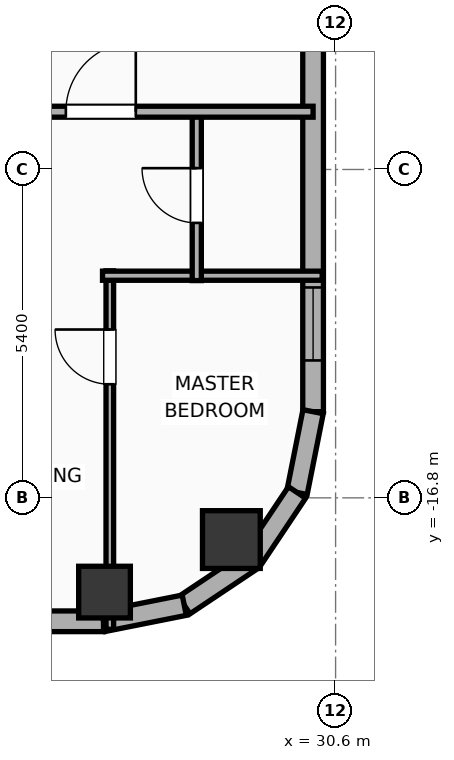
"""IFC4 building model, lengths in metres.
Left out: names, types, materials, properties, quantities, classifications, styles, units other than length and angle.
Written with IfcOpenShell. Run it as: python <this file> out.ifc"""

import sys

from ifc_helpers import new_model, si_unit, direction, frame, frame_2d, origin, origin_2d, place, context, subcontext, project, spatial, rectangle, hollow_rectangle, hollow_circle, extrude, element, fill, save


model = new_model("IFC4")
c1 = context("Model", 3, precision=1e-05, world=origin(), true_north=direction((0.0, 1.0)))
c2 = subcontext(c1, "Body", "Model", "MODEL_VIEW")
j1 = project(units=[si_unit("LENGTHUNIT", "METRE"), si_unit("PLANEANGLEUNIT", "RADIAN")], contexts=[c1])
p1 = place(None, origin())
s1 = spatial("IfcSite", under=j1, at=p1, CompositionType="ELEMENT")
p2 = place(p1, origin())
s2 = spatial("IfcBuilding", under=s1, at=p2, CompositionType="ELEMENT")
p3 = place(p2, frame((0.0, 0.0, 239.2)))
s3 = spatial("IfcBuildingStorey", under=s2, at=p3, CompositionType="ELEMENT", Elevation=239.2)
p4 = place(p3, frame((26.8, -18.35, 0.0), z_axis=(0.0, 0.0, 1.0), x_axis=(1.0, 0.0, 0.0)))
e1 = element("IfcColumn", 1, at=p4, inside=s3, PredefinedType="COLUMN", context=c2, shape_type="SweptSolid", body=[
    extrude(hollow_rectangle(XDim=0.85, YDim=0.85, WallThickness=0.028, at=origin_2d()), origin(), (0.0, 0.0, 1.0), 3.9),
])
p5 = place(p3, frame((28.886, -17.486, 0.0), z_axis=(0.0, 0.0, 1.0), x_axis=(1.0, 0.0, 0.0)))
e2 = element("IfcColumn", 2, at=p5, inside=s3, PredefinedType="COLUMN", context=c2, shape_type="SweptSolid", body=[
    extrude(hollow_circle(Radius=0.475, WallThickness=0.032, at=origin_2d()), origin(), (0.0, 0.0, 1.0), 3.9),
])
p6 = place(p3, frame((26.783, -18.83, 0.0), z_axis=(0.0, 0.0, 1.0), x_axis=(-1.0, 0.0, 0.0)))
e3 = element("IfcWall", 3, at=p6, inside=s3, PredefinedType="ELEMENTEDWALL", context=c2, shape_type="SweptSolid", body=[
    extrude(rectangle(XDim=49.566, YDim=0.34, at=frame_2d((24.783, 0.0))), origin(), (0.0, 0.0, 1.0), 3.65),
])
p7 = place(p6, frame((23.583, 0.0, 0.75)))
e4 = element("IfcOpeningElement", 4, at=p7, cuts=e3, PredefinedType="OPENING", context=c2, shape_type="SweptSolid", body=[
    extrude(rectangle(XDim=2.4, YDim=2.1, at=frame_2d((1.2, 1.05))), frame((0.0, 0.18, 0.0), z_axis=(0.0, -1.0, 0.0), x_axis=(1.0, 0.0, 0.0)), (0.0, 0.0, 1.0), 0.36),
])
p8 = place(p6, frame((41.756, 0.0, 0.75)))
e5 = element("IfcOpeningElement", 5, at=p8, cuts=e3, PredefinedType="OPENING", context=c2, shape_type="SweptSolid", body=[
    extrude(rectangle(XDim=2.4, YDim=2.1, at=frame_2d((1.2, 1.05))), frame((0.0, 0.18, 0.0), z_axis=(0.0, -1.0, 0.0), x_axis=(1.0, 0.0, 0.0)), (0.0, 0.0, 1.0), 0.36),
])
p9 = place(p6, frame((47.222, 0.0, 0.75)))
e6 = element("IfcOpeningElement", 6, at=p9, cuts=e3, PredefinedType="OPENING", context=c2, shape_type="SweptSolid", body=[
    extrude(rectangle(XDim=1.2, YDim=2.05, at=frame_2d((0.6, 1.025))), frame((0.0, 0.18, 0.0), z_axis=(0.0, -1.0, 0.0), x_axis=(1.0, 0.0, 0.0)), (0.0, 0.0, 1.0), 0.36),
])
p10 = place(p6, frame((45.263, 0.0, 0.75)))
e7 = element("IfcOpeningElement", 7, at=p10, cuts=e3, PredefinedType="OPENING", context=c2, shape_type="SweptSolid", body=[
    extrude(rectangle(XDim=1.2, YDim=2.05, at=frame_2d((0.6, 1.025))), frame((0.0, 0.18, 0.0), z_axis=(0.0, -1.0, 0.0), x_axis=(1.0, 0.0, 0.0)), (0.0, 0.0, 1.0), 0.36),
])
p11 = place(p6, frame((37.289, 0.0, 0.75)))
e8 = element("IfcOpeningElement", 8, at=p11, cuts=e3, PredefinedType="OPENING", context=c2, shape_type="SweptSolid", body=[
    extrude(rectangle(XDim=1.2, YDim=2.05, at=frame_2d((0.6, 1.025))), frame((0.0, 0.18, 0.0), z_axis=(0.0, -1.0, 0.0), x_axis=(1.0, 0.0, 0.0)), (0.0, 0.0, 1.0), 0.36),
])
p12 = place(p6, frame((16.115, 0.0, 0.75)))
e9 = element("IfcOpeningElement", 9, at=p12, cuts=e3, PredefinedType="OPENING", context=c2, shape_type="SweptSolid", body=[
    extrude(rectangle(XDim=1.2, YDim=2.05, at=frame_2d((0.6, 1.025))), frame((0.0, 0.18, 0.0), z_axis=(0.0, -1.0, 0.0), x_axis=(1.0, 0.0, 0.0)), (0.0, 0.0, 1.0), 0.36),
])
p13 = place(p6, frame((12.422, 0.0, 0.75)))
e10 = element("IfcOpeningElement", 10, at=p13, cuts=e3, PredefinedType="OPENING", context=c2, shape_type="SweptSolid", body=[
    extrude(rectangle(XDim=1.2, YDim=2.05, at=frame_2d((0.6, 1.025))), frame((0.0, 0.18, 0.0), z_axis=(0.0, -1.0, 0.0), x_axis=(1.0, 0.0, 0.0)), (0.0, 0.0, 1.0), 0.36),
])
p14 = place(p6, frame((8.01, 0.0, 0.75)))
e11 = element("IfcOpeningElement", 11, at=p14, cuts=e3, PredefinedType="OPENING", context=c2, shape_type="SweptSolid", body=[
    extrude(rectangle(XDim=1.2, YDim=2.05, at=frame_2d((0.6, 1.025))), frame((0.0, 0.18, 0.0), z_axis=(0.0, -1.0, 0.0), x_axis=(1.0, 0.0, 0.0)), (0.0, 0.0, 1.0), 0.36),
])
p15 = place(p6, frame((5.037, 0.0, 0.75)))
e12 = element("IfcOpeningElement", 12, at=p15, cuts=e3, PredefinedType="OPENING", context=c2, shape_type="SweptSolid", body=[
    extrude(rectangle(XDim=1.2, YDim=2.05, at=frame_2d((0.6, 1.025))), frame((0.0, 0.18, 0.0), z_axis=(0.0, -1.0, 0.0), x_axis=(1.0, 0.0, 0.0)), (0.0, 0.0, 1.0), 0.36),
])
p16 = place(p6, frame((1.811, 0.0, 0.75)))
e13 = element("IfcOpeningElement", 13, at=p16, cuts=e3, PredefinedType="OPENING", context=c2, shape_type="SweptSolid", body=[
    extrude(rectangle(XDim=1.2, YDim=2.05, at=frame_2d((0.6, 1.025))), frame((0.0, 0.18, 0.0), z_axis=(0.0, -1.0, 0.0), x_axis=(1.0, 0.0, 0.0)), (0.0, 0.0, 1.0), 0.36),
])
p17 = place(p6, frame((32.253, 0.0, 0.75)))
e14 = element("IfcOpeningElement", 14, at=p17, cuts=e3, PredefinedType="OPENING", context=c2, shape_type="SweptSolid", body=[
    extrude(rectangle(XDim=1.2, YDim=2.05, at=frame_2d((0.6, 1.025))), frame((0.0, 0.18, 0.0), z_axis=(0.0, -1.0, 0.0), x_axis=(1.0, 0.0, 0.0)), (0.0, 0.0, 1.0), 0.36),
])
p18 = place(p6, frame((27.853, 0.0, 0.75)))
e15 = element("IfcOpeningElement", 15, at=p18, cuts=e3, PredefinedType="OPENING", context=c2, shape_type="SweptSolid", body=[
    extrude(rectangle(XDim=1.2, YDim=2.05, at=frame_2d((0.6, 1.025))), frame((0.0, 0.18, 0.0), z_axis=(0.0, -1.0, 0.0), x_axis=(1.0, 0.0, 0.0)), (0.0, 0.0, 1.0), 0.36),
])
p19 = place(p6, frame((20.473, 0.0, 0.75)))
e16 = element("IfcOpeningElement", 16, at=p19, cuts=e3, PredefinedType="OPENING", context=c2, shape_type="SweptSolid", body=[
    extrude(rectangle(XDim=1.2, YDim=2.05, at=frame_2d((0.6, 1.025))), frame((0.0, 0.18, 0.0), z_axis=(0.0, -1.0, 0.0), x_axis=(1.0, 0.0, 0.0)), (0.0, 0.0, 1.0), 0.36),
])
p20 = place(p3, frame((30.23, 16.583, 0.0), z_axis=(0.0, 0.0, 1.0), x_axis=(0.0, -1.0, 0.0)))
e17 = element("IfcWall", 17, at=p20, inside=s3, PredefinedType="ELEMENTEDWALL", context=c2, shape_type="SweptSolid", body=[
    extrude(rectangle(XDim=31.967, YDim=0.34, at=frame_2d((15.983, 0.0))), origin(), (0.0, 0.0, 1.0), 3.65),
])
p21 = place(p20, frame((29.924, 0.0, 0.75)))
e18 = element("IfcOpeningElement", 18, at=p21, cuts=e17, PredefinedType="OPENING", context=c2, shape_type="SweptSolid", body=[
    extrude(rectangle(XDim=1.2, YDim=2.05, at=frame_2d((0.6, 1.025))), frame((0.0, 0.18, 0.0), z_axis=(0.0, -1.0, 0.0), x_axis=(1.0, 0.0, 0.0)), (0.0, 0.0, 1.0), 0.36),
])
p22 = place(p20, frame((11.463, 0.0, 0.75)))
e19 = element("IfcOpeningElement", 19, at=p22, cuts=e17, PredefinedType="OPENING", context=c2, shape_type="SweptSolid", body=[
    extrude(rectangle(XDim=1.2, YDim=2.05, at=frame_2d((0.6, 1.025))), frame((0.0, 0.18, 0.0), z_axis=(0.0, -1.0, 0.0), x_axis=(1.0, 0.0, 0.0)), (0.0, 0.0, 1.0), 0.36),
])
p23 = place(p20, frame((20.363, 0.0, 0.75)))
e20 = element("IfcOpeningElement", 20, at=p23, cuts=e17, PredefinedType="OPENING", context=c2, shape_type="SweptSolid", body=[
    extrude(rectangle(XDim=1.2, YDim=2.05, at=frame_2d((0.6, 1.025))), frame((0.0, 0.18, 0.0), z_axis=(0.0, -1.0, 0.0), x_axis=(1.0, 0.0, 0.0)), (0.0, 0.0, 1.0), 0.36),
])
p24 = place(p3, frame((30.23, -15.383, 0.0), z_axis=(0.0, 0.0, 1.0), x_axis=(-0.195110379894, -0.98078129043, 0.0)))
e21 = element("IfcWall", 21, at=p24, inside=s3, PredefinedType="ELEMENTEDWALL", context=c2, shape_type="SweptSolid", body=[
    extrude(rectangle(XDim=1.354, YDim=0.34, at=frame_2d((0.677, 0.0))), origin(), (0.0, 0.0, 1.0), 3.65),
])
p25 = place(p3, frame((29.966, -16.711, 0.0), z_axis=(0.0, 0.0, 1.0), x_axis=(-0.555584683399, -0.831459956686, 0.0)))
e22 = element("IfcWall", 22, at=p25, inside=s3, PredefinedType="ELEMENTEDWALL", context=c2, shape_type="SweptSolid", body=[
    extrude(rectangle(XDim=1.337, YDim=0.34, at=frame_2d((0.668, 0.0))), origin(), (0.0, 0.0, 1.0), 3.65),
])
p26 = place(p3, frame((29.223, -17.823, 0.0), z_axis=(0.0, 0.0, 1.0), x_axis=(-0.831403586725, -0.555669034571, 0.0)))
e23 = element("IfcWall", 23, at=p26, inside=s3, PredefinedType="ELEMENTEDWALL", context=c2, shape_type="SweptSolid", body=[
    extrude(rectangle(XDim=1.337, YDim=0.34, at=frame_2d((0.668, 0.0))), origin(), (0.0, 0.0, 1.0), 3.65),
])
p27 = place(p3, frame((28.111, -18.566, 0.0), z_axis=(0.0, 0.0, 1.0), x_axis=(-0.980788153188, -0.195075878998, 0.0)))
e24 = element("IfcWall", 24, at=p27, inside=s3, PredefinedType="ELEMENTEDWALL", context=c2, shape_type="SweptSolid", body=[
    extrude(rectangle(XDim=1.354, YDim=0.34, at=frame_2d((0.677, 0.0))), origin(), (0.0, 0.0, 1.0), 3.65),
])
p28 = place(p3, frame((26.887, -18.962, 0.0), z_axis=(0.0, 0.0, 1.0), x_axis=(0.0, 1.0, 0.0)))
e25 = element("IfcWall", 25, at=p28, inside=s3, PredefinedType="PARTITIONING", context=c2, shape_type="SweptSolid", body=[
    extrude(rectangle(XDim=5.896, YDim=0.125, at=frame_2d((2.948, 0.0))), origin(), (0.0, 0.0, 1.0), 3.65),
])
p29 = place(p28, frame((4.031, 0.0, 0.0)))
e26 = element("IfcOpeningElement", 26, at=p29, cuts=e25, PredefinedType="OPENING", context=c2, shape_type="SweptSolid", body=[
    extrude(rectangle(XDim=0.9, YDim=2.05, at=frame_2d((0.45, 1.025))), frame((0.0, 0.073, 0.0), z_axis=(0.0, -1.0, 0.0), x_axis=(1.0, 0.0, 0.0)), (0.0, 0.0, 1.0), 0.145),
])
p30 = place(p3, frame((26.767, -13.147, 0.0), z_axis=(0.0, 0.0, 1.0), x_axis=(1.0, 0.0, 0.0)))
e27 = element("IfcWall", 27, at=p30, inside=s3, PredefinedType="PLUMBINGWALL", context=c2, shape_type="SweptSolid", body=[
    extrude(rectangle(XDim=3.613, YDim=0.15, at=frame_2d((1.806, 0.0))), origin(), (0.0, 0.0, 1.0), 3.65),
])
p31 = place(p3, frame((28.317, -13.227, 0.0), z_axis=(0.0, 0.0, 1.0), x_axis=(0.0, 1.0, 0.0)))
e28 = element("IfcWall", 28, at=p31, inside=s3, PredefinedType="PLUMBINGWALL", context=c2, shape_type="SweptSolid", body=[
    extrude(rectangle(XDim=2.797, YDim=0.15, at=frame_2d((1.398, 0.0))), origin(), (0.0, 0.0, 1.0), 3.65),
])
p32 = place(p31, frame((0.948, 0.0, 0.0)))
e29 = element("IfcOpeningElement", 29, at=p32, cuts=e28, PredefinedType="OPENING", context=c2, shape_type="SweptSolid", body=[
    extrude(rectangle(XDim=0.9, YDim=2.05, at=frame_2d((0.45, 1.025))), frame((0.0, 0.085, 0.0), z_axis=(0.0, -1.0, 0.0), x_axis=(1.0, 0.0, 0.0)), (0.0, 0.0, 1.0), 0.17),
])
p33 = place(p3, frame((8.08, -10.45, 0.0), z_axis=(0.0, 0.0, 1.0), x_axis=(1.0, 0.0, 0.0)))
e30 = element("IfcWall", 30, at=p33, inside=s3, PredefinedType="PARTITIONING", context=c2, shape_type="SweptSolid", body=[
    extrude(rectangle(XDim=22.15, YDim=0.18, at=frame_2d((11.075, 0.0))), origin(), (0.0, 0.0, 1.0), 3.65),
])
p34 = place(p33, frame((3.283, 0.0, 0.0)))
e31 = element("IfcOpeningElement", 31, at=p34, cuts=e30, PredefinedType="OPENING", context=c2, shape_type="SweptSolid", body=[
    extrude(rectangle(XDim=1.15, YDim=2.05, at=frame_2d((0.575, 1.025))), frame((0.0, 0.1, 0.0), z_axis=(0.0, -1.0, 0.0), x_axis=(1.0, 0.0, 0.0)), (0.0, 0.0, 1.0), 0.2),
])
p35 = place(p33, frame((10.668, 0.0, 0.0)))
e32 = element("IfcOpeningElement", 32, at=p35, cuts=e30, PredefinedType="OPENING", context=c2, shape_type="SweptSolid", body=[
    extrude(rectangle(XDim=1.15, YDim=2.05, at=frame_2d((0.575, 1.025))), frame((0.0, 0.1, 0.0), z_axis=(0.0, -1.0, 0.0), x_axis=(1.0, 0.0, 0.0)), (0.0, 0.0, 1.0), 0.2),
])
p36 = place(p33, frame((18.084, 0.0, 0.0)))
e33 = element("IfcOpeningElement", 33, at=p36, cuts=e30, PredefinedType="OPENING", context=c2, shape_type="SweptSolid", body=[
    extrude(rectangle(XDim=1.15, YDim=2.05, at=frame_2d((0.575, 1.025))), frame((0.0, 0.1, 0.0), z_axis=(0.0, -1.0, 0.0), x_axis=(1.0, 0.0, 0.0)), (0.0, 0.0, 1.0), 0.2),
])
p37 = place(p21, origin())
e34 = element("IfcWindow", 34, at=p37, inside=s3, PartitioningType="SINGLE_PANEL", PredefinedType="WINDOW", context=c2, shape_type="SweptSolid", body=[
    extrude(rectangle(XDim=1.2, YDim=2.05, at=frame_2d((0.6, 1.025))), frame((0.0, 0.03, 0.0), z_axis=(0.0, -1.0, 0.0), x_axis=(1.0, 0.0, 0.0)), (0.0, 0.0, 1.0), 0.06),
])
fill(e18, e34)
p38 = place(p29, origin())
e35 = element("IfcDoor", 35, at=p38, inside=s3, OperationType="SINGLE_SWING_RIGHT", PredefinedType="DOOR", context=c2, shape_type="SweptSolid", body=[
    extrude(rectangle(XDim=0.9, YDim=2.05, at=frame_2d((0.45, 1.025))), frame((0.0, 0.025, 0.0), z_axis=(0.0, -1.0, 0.0), x_axis=(1.0, 0.0, 0.0)), (0.0, 0.0, 1.0), 0.05),
])
fill(e26, e35)
p39 = place(p32, origin())
e36 = element("IfcDoor", 36, at=p39, inside=s3, OperationType="SINGLE_SWING_RIGHT", PredefinedType="DOOR", context=c2, shape_type="SweptSolid", body=[
    extrude(rectangle(XDim=0.9, YDim=2.05, at=frame_2d((0.45, 1.025))), frame((0.0, 0.025, 0.0), z_axis=(0.0, -1.0, 0.0), x_axis=(1.0, 0.0, 0.0)), (0.0, 0.0, 1.0), 0.05),
])
fill(e29, e36)
p40 = place(p36, origin())
e37 = element("IfcDoor", 37, at=p40, inside=s3, OperationType="SINGLE_SWING_RIGHT", PredefinedType="DOOR", context=c2, shape_type="SweptSolid", body=[
    extrude(rectangle(XDim=1.15, YDim=2.05, at=frame_2d((0.575, 1.025))), frame((0.0, 0.025, 0.0), z_axis=(0.0, -1.0, 0.0), x_axis=(1.0, 0.0, 0.0)), (0.0, 0.0, 1.0), 0.05),
])
fill(e33, e37)
save(model, sys.argv[1])
